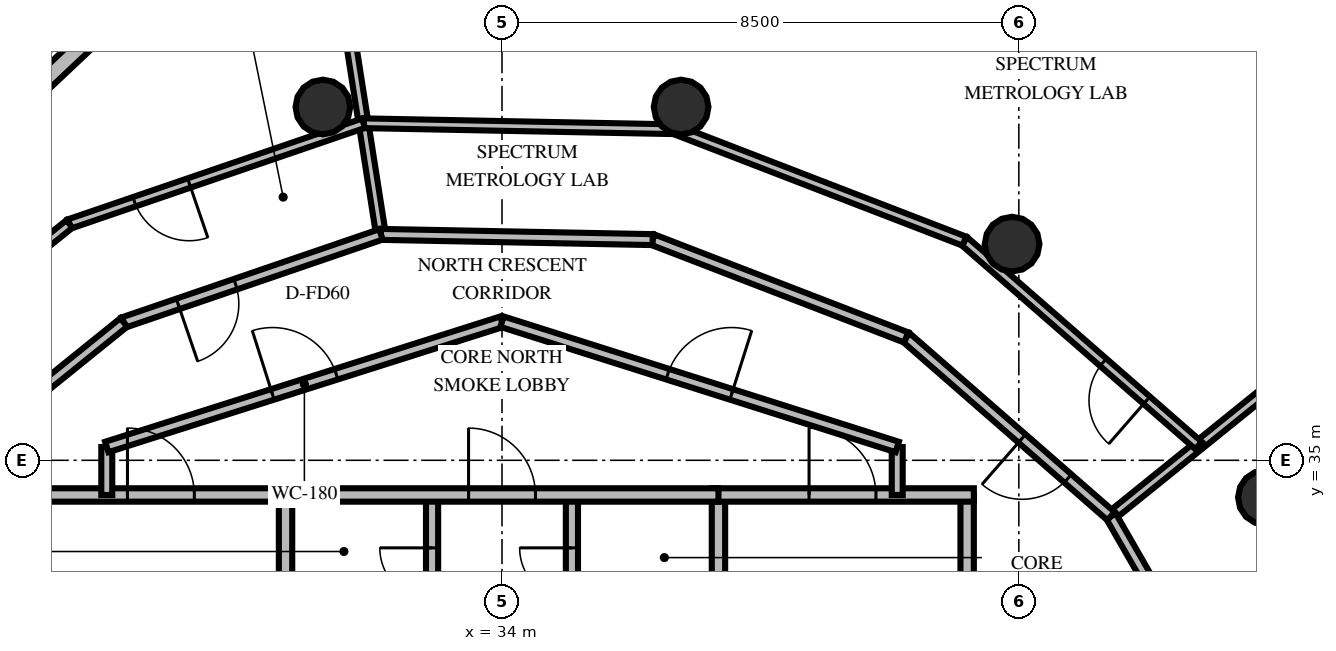
"""IFC4 building model, lengths in metres.
Left out: names, types, materials, properties, quantities, classifications, styles, units other than length and angle.
Written with IfcOpenShell. Run it as: python <this file> out.ifc"""

import sys

from ifc_helpers import new_model, si_unit, direction, frame, frame_2d, origin, origin_2d, place, context, subcontext, project, spatial, rectangle, circle, extrude, element, fill, save


model = new_model("IFC4")
c1 = context("Model", 3, precision=1e-05, world=origin(), true_north=direction((0.0, 1.0)))
c2 = subcontext(c1, "Body", "Model", "MODEL_VIEW")
j1 = project(units=[si_unit("LENGTHUNIT", "METRE"), si_unit("PLANEANGLEUNIT", "RADIAN")], contexts=[c1])
p1 = place(None, origin())
s1 = spatial("IfcSite", under=j1, at=p1, CompositionType="ELEMENT")
p2 = place(p1, origin())
s2 = spatial("IfcBuilding", under=s1, at=p2, CompositionType="ELEMENT")
p3 = place(p2, frame((0.0, 0.0, 273.6)))
s3 = spatial("IfcBuildingStorey", under=s2, at=p3, CompositionType="ELEMENT", Elevation=273.6)
for number, where, z_axis, x_axis in (
    (1, (46.555, 34.389, 0.0), (0.0, 0.0, 1.0), (1.0, 0.0, 0.0)),
    (2, (42.389, 38.555, 0.0), (0.0, 0.0, 1.0), (1.0, 0.0, 0.0)),
    (3, (36.946, 40.81, 0.0), (0.0, 0.0, 1.0), (1.0, 0.0, 0.0)),
    (4, (31.054, 40.81, 0.0), (0.0, 0.0, 1.0), (1.0, 0.0, 0.0)),
):
    element("IfcColumn", number, at=place(p3, frame(where, z_axis=z_axis, x_axis=x_axis)), inside=s3, PredefinedType="COLUMN", context=c2, shape_type="SweptSolid", body=[
        extrude(circle(Radius=0.45, at=origin_2d()), origin(), (0.0, 0.0, 1.0), 3.6),
    ])
p4 = place(p3, frame((27.485, 42.193, 0.0), z_axis=(0.0, 0.0, 1.0), x_axis=(-0.727660844175, -0.685937093219, 0.0)))
e5 = element("IfcWall", 5, at=p4, inside=s3, PredefinedType="SOLIDWALL", context=c2, shape_type="SweptSolid", body=[
    extrude(rectangle(XDim=7.115, YDim=0.3, at=frame_2d((3.558, 0.0))), origin(), (0.0, 0.0, 1.0), 2.76),
])
p5 = place(p4, frame((2.508, 0.0, 0.8)))
e6 = element("IfcOpeningElement", 6, at=p5, cuts=e5, PredefinedType="OPENING", context=c2, shape_type="SweptSolid", body=[
    extrude(rectangle(XDim=2.1, YDim=1.85, at=frame_2d((1.05, 0.925))), frame((0.0, 0.16, 0.0), z_axis=(0.0, -1.0, 0.0), x_axis=(1.0, 0.0, 0.0)), (0.0, 0.0, 1.0), 0.32),
])
p6 = place(p3, frame((48.908, 40.053, 0.0), z_axis=(0.0, 0.0, 1.0), x_axis=(-0.71871914798, 0.695300500739, 0.0)))
e7 = element("IfcWall", 7, at=p6, inside=s3, PredefinedType="SOLIDWALL", context=c2, shape_type="SweptSolid", body=[
    extrude(rectangle(XDim=5.65, YDim=0.3, at=frame_2d((2.825, 0.0))), origin(), (0.0, 0.0, 1.0), 2.76),
])
p7 = place(p6, frame((1.775, 0.0, 0.8)))
e8 = element("IfcOpeningElement", 8, at=p7, cuts=e7, PredefinedType="OPENING", context=c2, shape_type="SweptSolid", body=[
    extrude(rectangle(XDim=2.1, YDim=1.85, at=frame_2d((1.05, 0.925))), frame((0.0, 0.16, 0.0), z_axis=(0.0, -1.0, 0.0), x_axis=(1.0, 0.0, 0.0)), (0.0, 0.0, 1.0), 0.32),
])
p8 = place(p3, frame((30.44, 30.05, 0.0), z_axis=(0.0, 0.0, 1.0), x_axis=(0.0, 1.0, 0.0)))
e9 = element("IfcWall", 9, at=p8, inside=s3, PredefinedType="SOLIDWALL", context=c2, shape_type="SweptSolid", body=[
    extrude(rectangle(XDim=4.38, YDim=0.22, at=frame_2d((2.19, 0.0))), origin(), (0.0, 0.0, 1.0), 2.46),
])
p9 = place(p8, frame((0.8, 0.0, 0.0)))
e10 = element("IfcOpeningElement", 10, at=p9, cuts=e9, PredefinedType="OPENING", context=c2, shape_type="SweptSolid", body=[
    extrude(rectangle(XDim=1.05, YDim=2.1, at=frame_2d((0.525, 1.05))), frame((0.0, 0.12, 0.0), z_axis=(0.0, -1.0, 0.0), x_axis=(1.0, 0.0, 0.0)), (0.0, 0.0, 1.0), 0.24),
])
p10 = place(p3, frame((26.24, 34.43, 0.0), z_axis=(0.0, 0.0, 1.0), x_axis=(1.0, 0.0, 0.0)))
e11 = element("IfcWall", 11, at=p10, inside=s3, PredefinedType="SOLIDWALL", context=c2, shape_type="SweptSolid", body=[
    extrude(rectangle(XDim=4.31, YDim=0.22, at=frame_2d((2.155, 0.0))), origin(), (0.0, 0.0, 1.0), 2.46),
])
p11 = place(p10, frame((1.6, 0.0, 0.0)))
e12 = element("IfcOpeningElement", 12, at=p11, cuts=e11, PredefinedType="OPENING", context=c2, shape_type="SweptSolid", body=[
    extrude(rectangle(XDim=1.1, YDim=2.15, at=frame_2d((0.55, 1.075))), frame((0.0, 0.12, 0.0), z_axis=(0.0, -1.0, 0.0), x_axis=(1.0, 0.0, 0.0)), (0.0, 0.0, 1.0), 0.24),
])
p12 = place(p3, frame((32.85, 30.05, 0.0), z_axis=(0.0, 0.0, 1.0), x_axis=(0.0, 1.0, 0.0)))
e13 = element("IfcWall", 13, at=p12, inside=s3, PredefinedType="SOLIDWALL", context=c2, shape_type="SweptSolid", body=[
    extrude(rectangle(XDim=4.38, YDim=0.2, at=frame_2d((2.19, 0.0))), origin(), (0.0, 0.0, 1.0), 2.46),
])
p13 = place(p12, frame((2.65, 0.0, 0.0)))
e14 = element("IfcOpeningElement", 14, at=p13, cuts=e13, PredefinedType="OPENING", context=c2, shape_type="SweptSolid", body=[
    extrude(rectangle(XDim=0.86, YDim=2.05, at=frame_2d((0.43, 1.025))), frame((0.0, 0.11, 0.0), z_axis=(0.0, -1.0, 0.0), x_axis=(1.0, 0.0, 0.0)), (0.0, 0.0, 1.0), 0.22),
])
p14 = place(p3, frame((37.56, 30.05, 0.0), z_axis=(0.0, 0.0, 1.0), x_axis=(0.0, 1.0, 0.0)))
e15 = element("IfcWall", 15, at=p14, inside=s3, PredefinedType="SOLIDWALL", context=c2, shape_type="SweptSolid", body=[
    extrude(rectangle(XDim=4.38, YDim=0.22, at=frame_2d((2.19, 0.0))), origin(), (0.0, 0.0, 1.0), 2.46),
])
p15 = place(p14, frame((0.8, 0.0, 0.0)))
e16 = element("IfcOpeningElement", 16, at=p15, cuts=e15, PredefinedType="OPENING", context=c2, shape_type="SweptSolid", body=[
    extrude(rectangle(XDim=1.05, YDim=2.1, at=frame_2d((0.525, 1.05))), frame((0.0, 0.12, 0.0), z_axis=(0.0, -1.0, 0.0), x_axis=(1.0, 0.0, 0.0)), (0.0, 0.0, 1.0), 0.24),
])
p16 = place(p3, frame((41.65, 30.05, 0.0), z_axis=(0.0, 0.0, 1.0), x_axis=(0.0, 1.0, 0.0)))
e17 = element("IfcWall", 17, at=p16, inside=s3, PredefinedType="SOLIDWALL", context=c2, shape_type="SweptSolid", body=[
    extrude(rectangle(XDim=4.38, YDim=0.22, at=frame_2d((2.19, 0.0))), origin(), (0.0, 0.0, 1.0), 2.46),
])
p17 = place(p3, frame((37.45, 34.43, 0.0), z_axis=(0.0, 0.0, 1.0), x_axis=(1.0, 0.0, 0.0)))
e18 = element("IfcWall", 18, at=p17, inside=s3, PredefinedType="SOLIDWALL", context=c2, shape_type="SweptSolid", body=[
    extrude(rectangle(XDim=4.31, YDim=0.22, at=frame_2d((2.155, 0.0))), origin(), (0.0, 0.0, 1.0), 2.46),
])
p18 = place(p17, frame((1.6, 0.0, 0.0)))
e19 = element("IfcOpeningElement", 19, at=p18, cuts=e18, PredefinedType="OPENING", context=c2, shape_type="SweptSolid", body=[
    extrude(rectangle(XDim=1.1, YDim=2.15, at=frame_2d((0.55, 1.075))), frame((0.0, 0.12, 0.0), z_axis=(0.0, -1.0, 0.0), x_axis=(1.0, 0.0, 0.0)), (0.0, 0.0, 1.0), 0.24),
])
p19 = place(p3, frame((35.15, 30.05, 0.0), z_axis=(0.0, 0.0, 1.0), x_axis=(0.0, 1.0, 0.0)))
e20 = element("IfcWall", 20, at=p19, inside=s3, PredefinedType="SOLIDWALL", context=c2, shape_type="SweptSolid", body=[
    extrude(rectangle(XDim=4.38, YDim=0.2, at=frame_2d((2.19, 0.0))), origin(), (0.0, 0.0, 1.0), 2.46),
])
p20 = place(p19, frame((2.65, 0.0, 0.0)))
e21 = element("IfcOpeningElement", 21, at=p20, cuts=e20, PredefinedType="OPENING", context=c2, shape_type="SweptSolid", body=[
    extrude(rectangle(XDim=0.86, YDim=2.05, at=frame_2d((0.43, 1.025))), frame((0.0, 0.11, 0.0), z_axis=(0.0, -1.0, 0.0), x_axis=(1.0, 0.0, 0.0)), (0.0, 0.0, 1.0), 0.22),
])
p21 = place(p3, frame((30.44, 34.43, 0.0), z_axis=(0.0, 0.0, 1.0), x_axis=(1.0, 0.0, 0.0)))
e22 = element("IfcWall", 22, at=p21, inside=s3, PredefinedType="SOLIDWALL", context=c2, shape_type="SweptSolid", body=[
    extrude(rectangle(XDim=7.12, YDim=0.22, at=frame_2d((3.56, 0.0))), origin(), (0.0, 0.0, 1.0), 2.46),
])
p22 = place(p21, frame((3.01, 0.0, 0.0)))
e23 = element("IfcOpeningElement", 23, at=p22, cuts=e22, PredefinedType="OPENING", context=c2, shape_type="SweptSolid", body=[
    extrude(rectangle(XDim=1.1, YDim=2.15, at=frame_2d((0.55, 1.075))), frame((0.0, 0.12, 0.0), z_axis=(0.0, -1.0, 0.0), x_axis=(1.0, 0.0, 0.0)), (0.0, 0.0, 1.0), 0.24),
])
for number, where, z_axis, x_axis in (
    (24, (27.5, 34.43, 0.0), (0.0, 0.0, 1.0), (0.0, 1.0, 0.0)),
    (25, (40.5, 35.219, 0.0), (0.0, 0.0, 1.0), (0.0, -1.0, 0.0)),
):
    element("IfcWall", number, at=place(p3, frame(where, z_axis=z_axis, x_axis=x_axis)), inside=s3, PredefinedType="PARTITIONING", context=c2, shape_type="SweptSolid", body=[
        extrude(rectangle(XDim=0.789, YDim=0.18, at=frame_2d((0.395, 0.0))), origin(), (0.0, 0.0, 1.0), 2.46),
    ])
p23 = place(p3, frame((27.5, 35.219, 0.0), z_axis=(0.0, 0.0, 1.0), x_axis=(0.953228121756, 0.302251795518, 0.0)))
e26 = element("IfcWall", 26, at=p23, inside=s3, PredefinedType="PARTITIONING", context=c2, shape_type="SweptSolid", body=[
    extrude(rectangle(XDim=6.819, YDim=0.18, at=frame_2d((3.409, 0.0))), origin(), (0.0, 0.0, 1.0), 2.46),
])
p24 = place(p23, frame((2.86, 0.0, 0.0)))
e27 = element("IfcOpeningElement", 27, at=p24, cuts=e26, PredefinedType="OPENING", context=c2, shape_type="SweptSolid", body=[
    extrude(rectangle(XDim=1.1, YDim=2.15, at=frame_2d((0.55, 1.075))), frame((0.0, 0.1, 0.0), z_axis=(0.0, -1.0, 0.0), x_axis=(1.0, 0.0, 0.0)), (0.0, 0.0, 1.0), 0.2),
])
p25 = place(p3, frame((34.0, 37.28, 0.0), z_axis=(0.0, 0.0, 1.0), x_axis=(0.953228121756, -0.302251795518, 0.0)))
e28 = element("IfcWall", 28, at=p25, inside=s3, PredefinedType="PARTITIONING", context=c2, shape_type="SweptSolid", body=[
    extrude(rectangle(XDim=6.819, YDim=0.18, at=frame_2d((3.409, 0.0))), origin(), (0.0, 0.0, 1.0), 2.46),
])
p26 = place(p25, frame((2.86, 0.0, 0.0)))
e29 = element("IfcOpeningElement", 29, at=p26, cuts=e28, PredefinedType="OPENING", context=c2, shape_type="SweptSolid", body=[
    extrude(rectangle(XDim=1.1, YDim=2.15, at=frame_2d((0.55, 1.075))), frame((0.0, 0.1, 0.0), z_axis=(0.0, -1.0, 0.0), x_axis=(1.0, 0.0, 0.0)), (0.0, 0.0, 1.0), 0.2),
])
p27 = place(p3, frame((44.016, 34.082, 0.0), z_axis=(0.0, 0.0, 1.0), x_axis=(0.778218955655, 0.627993039021, 0.0)))
e30 = element("IfcWall", 30, at=p27, inside=s3, PredefinedType="PARTITIONING", context=c2, shape_type="SweptSolid", body=[
    extrude(rectangle(XDim=7.318, YDim=0.16, at=frame_2d((3.659, 0.0))), origin(), (0.0, 0.0, 1.0), 2.46),
])
p28 = place(p3, frame((46.023, 30.591, 0.0), z_axis=(0.0, 0.0, 1.0), x_axis=(-0.498481377227, 0.86690040752, 0.0)))
e31 = element("IfcWall", 31, at=p28, inside=s3, PredefinedType="PARTITIONING", context=c2, shape_type="SweptSolid", body=[
    extrude(rectangle(XDim=4.026, YDim=0.18, at=frame_2d((2.013, 0.0))), origin(), (0.0, 0.0, 1.0), 2.46),
])
p29 = place(p28, frame((0.832, 0.0, 0.0)))
e32 = element("IfcOpeningElement", 32, at=p29, cuts=e31, PredefinedType="OPENING", context=c2, shape_type="SweptSolid", body=[
    extrude(rectangle(XDim=1.0, YDim=2.15, at=frame_2d((0.5, 1.075))), frame((0.0, 0.1, 0.0), z_axis=(0.0, -1.0, 0.0), x_axis=(1.0, 0.0, 0.0)), (0.0, 0.0, 1.0), 0.2),
])
p30 = place(p3, frame((32.009, 38.715, 0.0), z_axis=(0.0, 0.0, 1.0), x_axis=(-0.154706776943, 0.987960430973, 0.0)))
e33 = element("IfcWall", 33, at=p30, inside=s3, PredefinedType="PARTITIONING", context=c2, shape_type="SweptSolid", body=[
    extrude(rectangle(XDim=5.621, YDim=0.16, at=frame_2d((2.811, 0.0))), origin(), (0.0, 0.0, 1.0), 2.46),
])
p31 = place(p3, frame((44.016, 34.082, 0.0), z_axis=(0.0, 0.0, 1.0), x_axis=(-0.753560422162, 0.657378650514, 0.0)))
e34 = element("IfcWall", 34, at=p31, inside=s3, PredefinedType="PARTITIONING", context=c2, shape_type="SweptSolid", body=[
    extrude(rectangle(XDim=4.47, YDim=0.18, at=frame_2d((2.235, 0.0))), origin(), (0.0, 0.0, 1.0), 2.46),
])
p32 = place(p31, frame((0.942, 0.0, 0.0)))
e35 = element("IfcOpeningElement", 35, at=p32, cuts=e34, PredefinedType="OPENING", context=c2, shape_type="SweptSolid", body=[
    extrude(rectangle(XDim=1.0, YDim=2.15, at=frame_2d((0.5, 1.075))), frame((0.0, 0.1, 0.0), z_axis=(0.0, -1.0, 0.0), x_axis=(1.0, 0.0, 0.0)), (0.0, 0.0, 1.0), 0.2),
])
p33 = place(p3, frame((40.648, 37.02, 0.0), z_axis=(0.0, 0.0, 1.0), x_axis=(-0.932964972783, 0.359967164557, 0.0)))
e36 = element("IfcWall", 36, at=p33, inside=s3, PredefinedType="PARTITIONING", context=c2, shape_type="SweptSolid", body=[
    extrude(rectangle(XDim=4.469, YDim=0.18, at=frame_2d((2.235, 0.0))), origin(), (0.0, 0.0, 1.0), 2.46),
])
p34 = place(p3, frame((36.478, 38.629, 0.0), z_axis=(0.0, 0.0, 1.0), x_axis=(-0.999815160221, 0.019226164239, 0.0)))
e37 = element("IfcWall", 37, at=p34, inside=s3, PredefinedType="PARTITIONING", context=c2, shape_type="SweptSolid", body=[
    extrude(rectangle(XDim=4.47, YDim=0.18, at=frame_2d((2.235, 0.0))), origin(), (0.0, 0.0, 1.0), 2.46),
])
p35 = place(p3, frame((45.456, 35.244, 0.0), z_axis=(0.0, 0.0, 1.0), x_axis=(-0.753561003445, 0.657377984182, 0.0)))
e38 = element("IfcWall", 38, at=p35, inside=s3, PredefinedType="PARTITIONING", context=c2, shape_type="SweptSolid", body=[
    extrude(rectangle(XDim=5.112, YDim=0.16, at=frame_2d((2.556, 0.0))), origin(), (0.0, 0.0, 1.0), 2.46),
])
p36 = place(p35, frame((1.131, 0.0, 0.0)))
e39 = element("IfcOpeningElement", 39, at=p36, cuts=e38, PredefinedType="OPENING", context=c2, shape_type="SweptSolid", body=[
    extrude(rectangle(XDim=0.95, YDim=2.15, at=frame_2d((0.475, 1.075))), frame((0.0, 0.09, 0.0), z_axis=(0.0, -1.0, 0.0), x_axis=(1.0, 0.0, 0.0)), (0.0, 0.0, 1.0), 0.18),
])
for number, where, z_axis, x_axis in (
    (40, (41.604, 38.604, 0.0), (0.0, 0.0, 1.0), (-0.933, 0.36, 0.0)),
    (41, (36.834, 40.445, 0.0), (0.0, 0.0, 1.0), (-1.0, 0.019, 0.0)),
):
    element("IfcWall", number, at=place(p3, frame(where, z_axis=z_axis, x_axis=x_axis)), inside=s3, PredefinedType="PARTITIONING", context=c2, shape_type="SweptSolid", body=[
        extrude(rectangle(XDim=5.112, YDim=0.16, at=frame_2d((2.556, 0.0))), origin(), (0.0, 0.0, 1.0), 2.46),
    ])
p37 = place(p3, frame((32.009, 38.715, 0.0), z_axis=(0.0, 0.0, 1.0), x_axis=(-0.946067972385, -0.323968195394, 0.0)))
e42 = element("IfcWall", 42, at=p37, inside=s3, PredefinedType="PARTITIONING", context=c2, shape_type="SweptSolid", body=[
    extrude(rectangle(XDim=4.469, YDim=0.18, at=frame_2d((2.235, 0.0))), origin(), (0.0, 0.0, 1.0), 2.46),
])
p38 = place(p37, frame((2.527, 0.0, 0.0)))
e43 = element("IfcOpeningElement", 43, at=p38, cuts=e42, PredefinedType="OPENING", context=c2, shape_type="SweptSolid", body=[
    extrude(rectangle(XDim=1.0, YDim=2.15, at=frame_2d((0.5, 1.075))), frame((0.0, 0.1, 0.0), z_axis=(0.0, -1.0, 0.0), x_axis=(1.0, 0.0, 0.0)), (0.0, 0.0, 1.0), 0.2),
])
p39 = place(p3, frame((27.78, 37.267, 0.0), z_axis=(0.0, 0.0, 1.0), x_axis=(-0.778283015722, -0.627913646483, 0.0)))
e44 = element("IfcWall", 44, at=p39, inside=s3, PredefinedType="PARTITIONING", context=c2, shape_type="SweptSolid", body=[
    extrude(rectangle(XDim=4.47, YDim=0.18, at=frame_2d((2.235, 0.0))), origin(), (0.0, 0.0, 1.0), 2.46),
])
p40 = place(p3, frame((31.723, 40.543, 0.0), z_axis=(0.0, 0.0, 1.0), x_axis=(-0.946082744304, -0.323925054496, 0.0)))
e45 = element("IfcWall", 45, at=p40, inside=s3, PredefinedType="PARTITIONING", context=c2, shape_type="SweptSolid", body=[
    extrude(rectangle(XDim=5.112, YDim=0.16, at=frame_2d((2.556, 0.0))), origin(), (0.0, 0.0, 1.0), 2.46),
])
p41 = place(p40, frame((3.032, 0.0, 0.0)))
e46 = element("IfcOpeningElement", 46, at=p41, cuts=e45, PredefinedType="OPENING", context=c2, shape_type="SweptSolid", body=[
    extrude(rectangle(XDim=0.95, YDim=2.15, at=frame_2d((0.475, 1.075))), frame((0.0, 0.09, 0.0), z_axis=(0.0, -1.0, 0.0), x_axis=(1.0, 0.0, 0.0)), (0.0, 0.0, 1.0), 0.18),
])
p42 = place(p3, frame((26.886, 38.887, 0.0), z_axis=(0.0, 0.0, 1.0), x_axis=(-0.778248151597, -0.627956857225, 0.0)))
e47 = element("IfcWall", 47, at=p42, inside=s3, PredefinedType="PARTITIONING", context=c2, shape_type="SweptSolid", body=[
    extrude(rectangle(XDim=5.112, YDim=0.16, at=frame_2d((2.556, 0.0))), origin(), (0.0, 0.0, 1.0), 2.46),
])
p43 = place(p7, origin())
e48 = element("IfcWindow", 48, at=p43, inside=s3, PartitioningType="SINGLE_PANEL", PredefinedType="WINDOW", context=c2, shape_type="SweptSolid", body=[
    extrude(rectangle(XDim=2.1, YDim=1.85, at=frame_2d((1.05, 0.925))), frame((0.0, 0.03, 0.0), z_axis=(0.0, -1.0, 0.0), x_axis=(1.0, 0.0, 0.0)), (0.0, 0.0, 1.0), 0.06),
])
fill(e8, e48)
p44 = place(p11, origin())
e49 = element("IfcDoor", 49, at=p44, inside=s3, OperationType="SINGLE_SWING_LEFT", PredefinedType="DOOR", context=c2, shape_type="SweptSolid", body=[
    extrude(rectangle(XDim=1.1, YDim=2.15, at=frame_2d((0.55, 1.075))), frame((0.0, 0.025, 0.0), z_axis=(0.0, -1.0, 0.0), x_axis=(1.0, 0.0, 0.0)), (0.0, 0.0, 1.0), 0.05),
])
fill(e12, e49)
p45 = place(p13, origin())
e50 = element("IfcDoor", 50, at=p45, inside=s3, OperationType="SINGLE_SWING_RIGHT", PredefinedType="TRAPDOOR", context=c2, shape_type="SweptSolid", body=[
    extrude(rectangle(XDim=0.86, YDim=2.05, at=frame_2d((0.43, 1.025))), frame((0.0, 0.025, 0.0), z_axis=(0.0, -1.0, 0.0), x_axis=(1.0, 0.0, 0.0)), (0.0, 0.0, 1.0), 0.05),
])
fill(e14, e50)
p46 = place(p18, origin())
e51 = element("IfcDoor", 51, at=p46, inside=s3, OperationType="SINGLE_SWING_LEFT", PredefinedType="DOOR", context=c2, shape_type="SweptSolid", body=[
    extrude(rectangle(XDim=1.1, YDim=2.15, at=frame_2d((0.55, 1.075))), frame((0.0, 0.025, 0.0), z_axis=(0.0, -1.0, 0.0), x_axis=(1.0, 0.0, 0.0)), (0.0, 0.0, 1.0), 0.05),
])
fill(e19, e51)
p47 = place(p20, origin())
e52 = element("IfcDoor", 52, at=p47, inside=s3, OperationType="SINGLE_SWING_RIGHT", PredefinedType="TRAPDOOR", context=c2, shape_type="SweptSolid", body=[
    extrude(rectangle(XDim=0.86, YDim=2.05, at=frame_2d((0.43, 1.025))), frame((0.0, 0.025, 0.0), z_axis=(0.0, -1.0, 0.0), x_axis=(1.0, 0.0, 0.0)), (0.0, 0.0, 1.0), 0.05),
])
fill(e21, e52)
p48 = place(p22, origin())
e53 = element("IfcDoor", 53, at=p48, inside=s3, OperationType="SINGLE_SWING_LEFT", PredefinedType="DOOR", context=c2, shape_type="SweptSolid", body=[
    extrude(rectangle(XDim=1.1, YDim=2.15, at=frame_2d((0.55, 1.075))), frame((0.0, 0.025, 0.0), z_axis=(0.0, -1.0, 0.0), x_axis=(1.0, 0.0, 0.0)), (0.0, 0.0, 1.0), 0.05),
])
fill(e23, e53)
p49 = place(p24, origin())
e54 = element("IfcDoor", 54, at=p49, inside=s3, OperationType="SINGLE_SWING_LEFT", PredefinedType="DOOR", context=c2, shape_type="SweptSolid", body=[
    extrude(rectangle(XDim=1.1, YDim=2.15, at=frame_2d((0.55, 1.075))), frame((0.0, 0.025, 0.0), z_axis=(0.0, -1.0, 0.0), x_axis=(1.0, 0.0, 0.0)), (0.0, 0.0, 1.0), 0.05),
])
fill(e27, e54)
p50 = place(p26, origin())
e55 = element("IfcDoor", 55, at=p50, inside=s3, OperationType="SINGLE_SWING_RIGHT", PredefinedType="DOOR", context=c2, shape_type="SweptSolid", body=[
    extrude(rectangle(XDim=1.1, YDim=2.15, at=frame_2d((0.55, 1.075))), frame((0.0, 0.025, 0.0), z_axis=(0.0, -1.0, 0.0), x_axis=(1.0, 0.0, 0.0)), (0.0, 0.0, 1.0), 0.05),
])
fill(e29, e55)
p51 = place(p32, origin())
e56 = element("IfcDoor", 56, at=p51, inside=s3, OperationType="SINGLE_SWING_RIGHT", PredefinedType="DOOR", context=c2, shape_type="SweptSolid", body=[
    extrude(rectangle(XDim=1.0, YDim=2.15, at=frame_2d((0.5, 1.075))), frame((0.0, 0.025, 0.0), z_axis=(0.0, -1.0, 0.0), x_axis=(1.0, 0.0, 0.0)), (0.0, 0.0, 1.0), 0.05),
])
fill(e35, e56)
p52 = place(p36, origin())
e57 = element("IfcDoor", 57, at=p52, inside=s3, OperationType="SINGLE_SWING_LEFT", PredefinedType="DOOR", context=c2, shape_type="SweptSolid", body=[
    extrude(rectangle(XDim=0.95, YDim=2.15, at=frame_2d((0.475, 1.075))), frame((0.0, 0.025, 0.0), z_axis=(0.0, -1.0, 0.0), x_axis=(1.0, 0.0, 0.0)), (0.0, 0.0, 1.0), 0.05),
])
fill(e39, e57)
p53 = place(p38, origin())
e58 = element("IfcDoor", 58, at=p53, inside=s3, OperationType="SINGLE_SWING_RIGHT", PredefinedType="DOOR", context=c2, shape_type="SweptSolid", body=[
    extrude(rectangle(XDim=1.0, YDim=2.15, at=frame_2d((0.5, 1.075))), frame((0.0, 0.025, 0.0), z_axis=(0.0, -1.0, 0.0), x_axis=(1.0, 0.0, 0.0)), (0.0, 0.0, 1.0), 0.05),
])
fill(e43, e58)
p54 = place(p41, origin())
e59 = element("IfcDoor", 59, at=p54, inside=s3, OperationType="SINGLE_SWING_LEFT", PredefinedType="DOOR", context=c2, shape_type="SweptSolid", body=[
    extrude(rectangle(XDim=0.95, YDim=2.15, at=frame_2d((0.475, 1.075))), frame((0.0, 0.025, 0.0), z_axis=(0.0, -1.0, 0.0), x_axis=(1.0, 0.0, 0.0)), (0.0, 0.0, 1.0), 0.05),
])
fill(e46, e59)
save(model, sys.argv[1])
